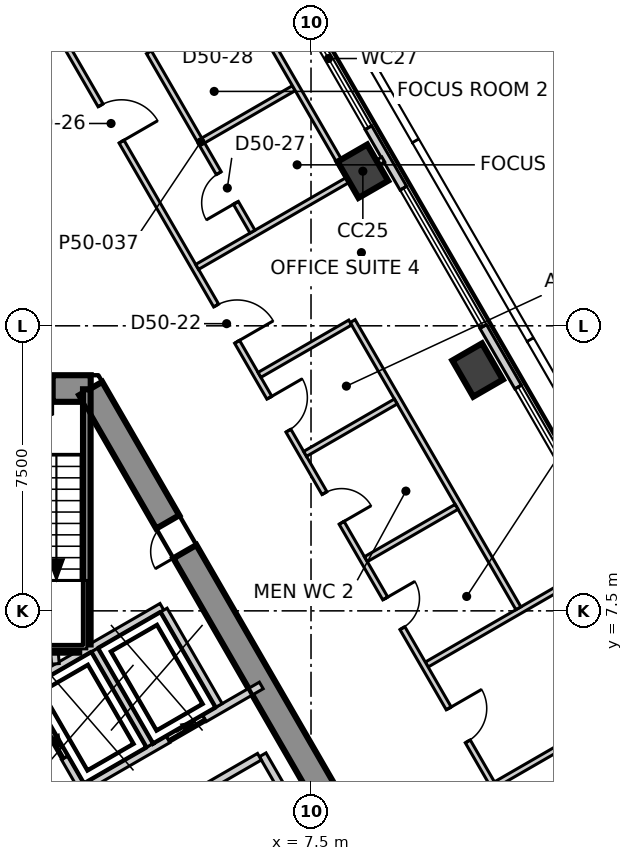
"""IFC4 building model, lengths in metres.
Left out: names, types, materials, properties, quantities, classifications, styles, units other than length and angle.
Written with IfcOpenShell. Run it as: python <this file> out.ifc"""

import sys

from ifc_helpers import new_model, si_unit, direction, frame, frame_2d, origin, origin_2d, place, context, subcontext, project, spatial, polyline, rectangle, outline, extrude, element, fill, save


model = new_model("IFC4")
c1 = context("Model", 3, precision=1e-05, world=origin(), true_north=direction((0.0, 1.0)))
c2 = subcontext(c1, "Body", "Model", "MODEL_VIEW")
j1 = project(units=[si_unit("LENGTHUNIT", "METRE"), si_unit("PLANEANGLEUNIT", "RADIAN")], contexts=[c1])
p1 = place(None, origin())
s1 = spatial("IfcSite", under=j1, at=p1, CompositionType="ELEMENT")
p2 = place(p1, origin())
s2 = spatial("IfcBuilding", under=s1, at=p2, CompositionType="ELEMENT")
p3 = place(p2, frame((0.0, 0.0, 215.3)))
s3 = spatial("IfcBuildingStorey", under=s2, at=p3, CompositionType="ELEMENT", Elevation=215.3)
p4 = place(p3, frame((1.703, 13.35, -0.3), z_axis=(0.0, 0.0, 1.0), x_axis=(-1.0, 0.0, 0.0)))
e1 = element("IfcWall", 1, at=p4, inside=s3, PredefinedType="SHEAR", context=c2, shape_type="SweptSolid", body=[
    extrude(outline(polyline([(-0.202, -0.35), (1.703, -0.35), (3.608, -0.35), (3.204, 0.35), (1.703, 0.35), (0.202, 0.35), (-0.202, -0.35)])), origin(), (0.0, 0.0, 1.0), 4.0),
])
p5 = place(p4, frame((1.003, 0.0, 0.3)))
e2 = element("IfcOpeningElement", 2, at=p5, cuts=e1, PredefinedType="OPENING", context=c2, shape_type="SweptSolid", body=[
    extrude(rectangle(XDim=1.4, YDim=2.1, at=frame_2d((0.7, 1.05))), frame((0.0, 0.36, 0.0), z_axis=(0.0, -1.0, 0.0), x_axis=(1.0, 0.0, 0.0)), (0.0, 0.0, 1.0), 0.72),
])
p6 = place(p3, frame((12.413, -5.2, -0.3), z_axis=(0.0, 0.0, 1.0), x_axis=(-0.500011533395, 0.866018744874, 0.0)))
e3 = element("IfcWall", 3, at=p6, inside=s3, PredefinedType="SHEAR", context=c2, shape_type="SweptSolid", body=[
    extrude(outline(polyline([(-0.202, -0.35), (1.782, -0.35), (3.766, -0.35), (5.75, -0.35), (7.734, -0.35), (9.718, -0.35), (11.702, -0.35), (13.686, -0.35), (15.67, -0.35), (17.654, -0.35), (19.638, -0.35), (21.622, -0.35), (21.218, 0.35), (19.307, 0.35), (17.397, 0.35), (15.486, 0.35), (13.576, 0.35), (11.665, 0.35), (9.755, 0.35), (7.844, 0.35), (5.934, 0.35), (4.023, 0.35), (2.113, 0.35), (0.202, 0.35), (-0.202, -0.35)])), origin(), (0.0, 0.0, 1.0), 4.0),
])
p7 = place(p6, frame((4.055, 0.0, 0.3)))
e4 = element("IfcOpeningElement", 4, at=p7, cuts=e3, PredefinedType="OPENING", context=c2, shape_type="SweptSolid", body=[
    extrude(rectangle(XDim=0.9, YDim=2.1, at=frame_2d((0.45, 1.05))), frame((0.0, 0.36, 0.0), z_axis=(0.0, -1.0, 0.0), x_axis=(1.0, 0.0, 0.0)), (0.0, 0.0, 1.0), 0.72),
])
p8 = place(p6, frame((16.465, 0.0, 0.3)))
e5 = element("IfcOpeningElement", 5, at=p8, cuts=e3, PredefinedType="OPENING", context=c2, shape_type="SweptSolid", body=[
    extrude(rectangle(XDim=0.9, YDim=2.1, at=frame_2d((0.45, 1.05))), frame((0.0, 0.36, 0.0), z_axis=(0.0, -1.0, 0.0), x_axis=(1.0, 0.0, 0.0)), (0.0, 0.0, 1.0), 0.72),
])
for number, where, z_axis, x_axis in (
    (6, (11.884, 13.836, -0.3), (0.0, 0.0, 1.0), (-0.5, 0.866, 0.0)),
    (7, (8.864, 19.068, -0.3), (0.0, 0.0, 1.0), (-0.5, 0.866, 0.0)),
):
    element("IfcColumn", number, at=place(p3, frame(where, z_axis=z_axis, x_axis=x_axis)), inside=s3, PredefinedType="COLUMN", context=c2, shape_type="SweptSolid", body=[
        extrude(rectangle(XDim=1.1, YDim=0.9, at=origin_2d()), origin(), (0.0, 0.0, 1.0), 4.0),
    ])
p9 = place(p3, frame((28.243, -13.098, 0.0), z_axis=(0.0, 0.0, 1.0), x_axis=(-0.500001688958, 0.866024428662, 0.0)))
e8 = element("IfcWall", 8, at=p9, inside=s3, PredefinedType="ELEMENTEDWALL", context=c2, shape_type="SweptSolid", body=[
    extrude(rectangle(XDim=50.909, YDim=0.2, at=frame_2d((25.455, 0.0))), origin(), (0.0, 0.0, 1.0), 3.7),
])
p10 = place(p9, frame((2.223, 0.0, 0.9)))
e9 = element("IfcOpeningElement", 9, at=p10, cuts=e8, PredefinedType="OPENING", context=c2, shape_type="SweptSolid", body=[
    extrude(rectangle(XDim=4.2, YDim=2.5, at=frame_2d((2.1, 1.25))), frame((0.0, 0.11, 0.0), z_axis=(0.0, -1.0, 0.0), x_axis=(1.0, 0.0, 0.0)), (0.0, 0.0, 1.0), 0.22),
])
p11 = place(p9, frame((8.263, 0.0, 0.9)))
e10 = element("IfcOpeningElement", 10, at=p11, cuts=e8, PredefinedType="OPENING", context=c2, shape_type="SweptSolid", body=[
    extrude(rectangle(XDim=4.2, YDim=2.5, at=frame_2d((2.1, 1.25))), frame((0.0, 0.11, 0.0), z_axis=(0.0, -1.0, 0.0), x_axis=(1.0, 0.0, 0.0)), (0.0, 0.0, 1.0), 0.22),
])
p12 = place(p9, frame((14.304, 0.0, 0.9)))
e11 = element("IfcOpeningElement", 11, at=p12, cuts=e8, PredefinedType="OPENING", context=c2, shape_type="SweptSolid", body=[
    extrude(rectangle(XDim=4.2, YDim=2.5, at=frame_2d((2.1, 1.25))), frame((0.0, 0.11, 0.0), z_axis=(0.0, -1.0, 0.0), x_axis=(1.0, 0.0, 0.0)), (0.0, 0.0, 1.0), 0.22),
])
p13 = place(p9, frame((20.345, 0.0, 0.9)))
e12 = element("IfcOpeningElement", 12, at=p13, cuts=e8, PredefinedType="OPENING", context=c2, shape_type="SweptSolid", body=[
    extrude(rectangle(XDim=4.2, YDim=2.5, at=frame_2d((2.1, 1.25))), frame((0.0, 0.11, 0.0), z_axis=(0.0, -1.0, 0.0), x_axis=(1.0, 0.0, 0.0)), (0.0, 0.0, 1.0), 0.22),
])
p14 = place(p9, frame((26.385, 0.0, 0.9)))
e13 = element("IfcOpeningElement", 13, at=p14, cuts=e8, PredefinedType="OPENING", context=c2, shape_type="SweptSolid", body=[
    extrude(rectangle(XDim=4.2, YDim=2.5, at=frame_2d((2.1, 1.25))), frame((0.0, 0.11, 0.0), z_axis=(0.0, -1.0, 0.0), x_axis=(1.0, 0.0, 0.0)), (0.0, 0.0, 1.0), 0.22),
])
p15 = place(p9, frame((32.426, 0.0, 0.9)))
e14 = element("IfcOpeningElement", 14, at=p15, cuts=e8, PredefinedType="OPENING", context=c2, shape_type="SweptSolid", body=[
    extrude(rectangle(XDim=4.2, YDim=2.5, at=frame_2d((2.1, 1.25))), frame((0.0, 0.11, 0.0), z_axis=(0.0, -1.0, 0.0), x_axis=(1.0, 0.0, 0.0)), (0.0, 0.0, 1.0), 0.22),
])
p16 = place(p9, frame((38.466, 0.0, 0.9)))
e15 = element("IfcOpeningElement", 15, at=p16, cuts=e8, PredefinedType="OPENING", context=c2, shape_type="SweptSolid", body=[
    extrude(rectangle(XDim=4.2, YDim=2.5, at=frame_2d((2.1, 1.25))), frame((0.0, 0.11, 0.0), z_axis=(0.0, -1.0, 0.0), x_axis=(1.0, 0.0, 0.0)), (0.0, 0.0, 1.0), 0.22),
])
p17 = place(p9, frame((44.507, 0.0, 0.9)))
e16 = element("IfcOpeningElement", 16, at=p17, cuts=e8, PredefinedType="OPENING", context=c2, shape_type="SweptSolid", body=[
    extrude(rectangle(XDim=4.2, YDim=2.5, at=frame_2d((2.1, 1.25))), frame((0.0, 0.11, 0.0), z_axis=(0.0, -1.0, 0.0), x_axis=(1.0, 0.0, 0.0)), (0.0, 0.0, 1.0), 0.22),
])
p18 = place(p3, frame((10.544, 6.087, 0.0), z_axis=(0.0, 0.0, 1.0), x_axis=(0.865959810878, 0.500113593041, 0.0)))
e17 = element("IfcWall", 17, at=p18, inside=s3, PredefinedType="PARTITIONING", context=c2, shape_type="SweptSolid", body=[
    extrude(rectangle(XDim=5.655, YDim=0.15, at=frame_2d((2.828, 0.0))), origin(), (0.0, 0.0, 1.0), 3.2),
])
p19 = place(p3, frame((0.075, 24.07, 0.0), z_axis=(0.0, 0.0, 1.0), x_axis=(0.500006834213, -0.866021458014, 0.0)))
e18 = element("IfcWall", 18, at=p19, inside=s3, PredefinedType="PARTITIONING", context=c2, shape_type="SweptSolid", body=[
    extrude(rectangle(XDim=41.616, YDim=0.15, at=frame_2d((20.808, 0.0))), origin(), (0.0, 0.0, 1.0), 3.7),
])
p20 = place(p19, frame((33.715, 0.0, 0.0)))
e19 = element("IfcOpeningElement", 19, at=p20, cuts=e18, PredefinedType="OPENING", context=c2, shape_type="SweptSolid", body=[
    extrude(rectangle(XDim=1.1, YDim=2.1, at=frame_2d((0.55, 1.05))), frame((0.0, 0.085, 0.0), z_axis=(0.0, -1.0, 0.0), x_axis=(1.0, 0.0, 0.0)), (0.0, 0.0, 1.0), 0.17),
])
p21 = place(p19, frame((22.098, 0.0, 0.0)))
e20 = element("IfcOpeningElement", 20, at=p21, cuts=e18, PredefinedType="OPENING", context=c2, shape_type="SweptSolid", body=[
    extrude(rectangle(XDim=1.0, YDim=2.1, at=frame_2d((0.5, 1.05))), frame((0.0, 0.085, 0.0), z_axis=(0.0, -1.0, 0.0), x_axis=(1.0, 0.0, 0.0)), (0.0, 0.0, 1.0), 0.17),
])
p22 = place(p19, frame((25.198, 0.0, 0.0)))
e21 = element("IfcOpeningElement", 21, at=p22, cuts=e18, PredefinedType="OPENING", context=c2, shape_type="SweptSolid", body=[
    extrude(rectangle(XDim=0.9, YDim=2.1, at=frame_2d((0.45, 1.05))), frame((0.0, 0.085, 0.0), z_axis=(0.0, -1.0, 0.0), x_axis=(1.0, 0.0, 0.0)), (0.0, 0.0, 1.0), 0.17),
])
p23 = place(p19, frame((9.858, 0.0, 0.0)))
e22 = element("IfcOpeningElement", 22, at=p23, cuts=e18, PredefinedType="OPENING", context=c2, shape_type="SweptSolid", body=[
    extrude(rectangle(XDim=1.1, YDim=2.1, at=frame_2d((0.55, 1.05))), frame((0.0, 0.085, 0.0), z_axis=(0.0, -1.0, 0.0), x_axis=(1.0, 0.0, 0.0)), (0.0, 0.0, 1.0), 0.17),
])
p24 = place(p19, frame((18.758, 0.0, 0.0)))
e23 = element("IfcOpeningElement", 23, at=p24, cuts=e18, PredefinedType="OPENING", context=c2, shape_type="SweptSolid", body=[
    extrude(rectangle(XDim=0.9, YDim=2.1, at=frame_2d((0.45, 1.05))), frame((0.0, 0.085, 0.0), z_axis=(0.0, -1.0, 0.0), x_axis=(1.0, 0.0, 0.0)), (0.0, 0.0, 1.0), 0.17),
])
p25 = place(p19, frame((15.558, 0.0, 0.0)))
e24 = element("IfcOpeningElement", 24, at=p25, cuts=e18, PredefinedType="OPENING", context=c2, shape_type="SweptSolid", body=[
    extrude(rectangle(XDim=0.9, YDim=2.1, at=frame_2d((0.45, 1.05))), frame((0.0, 0.085, 0.0), z_axis=(0.0, -1.0, 0.0), x_axis=(1.0, 0.0, 0.0)), (0.0, 0.0, 1.0), 0.17),
])
p26 = place(p19, frame((12.658, 0.0, 0.0)))
e25 = element("IfcOpeningElement", 25, at=p26, cuts=e18, PredefinedType="OPENING", context=c2, shape_type="SweptSolid", body=[
    extrude(rectangle(XDim=1.0, YDim=2.1, at=frame_2d((0.5, 1.05))), frame((0.0, 0.085, 0.0), z_axis=(0.0, -1.0, 0.0), x_axis=(1.0, 0.0, 0.0)), (0.0, 0.0, 1.0), 0.17),
])
p27 = place(p19, frame((3.776, 0.0, 0.0)))
e26 = element("IfcOpeningElement", 26, at=p27, cuts=e18, PredefinedType="OPENING", context=c2, shape_type="SweptSolid", body=[
    extrude(rectangle(XDim=1.1, YDim=2.1, at=frame_2d((0.55, 1.05))), frame((0.0, 0.085, 0.0), z_axis=(0.0, -1.0, 0.0), x_axis=(1.0, 0.0, 0.0)), (0.0, 0.0, 1.0), 0.17),
])
p28 = place(p3, frame((4.503, 16.55, 0.0), z_axis=(0.0, 0.0, 1.0), x_axis=(0.866021685936, 0.500006439447, 0.0)))
e27 = element("IfcWall", 27, at=p28, inside=s3, PredefinedType="PARTITIONING", context=c2, shape_type="SweptSolid", body=[
    extrude(rectangle(XDim=5.656, YDim=0.15, at=frame_2d((2.828, 0.0))), origin(), (0.0, 0.0, 1.0), 3.7),
])
p29 = place(p3, frame((8.595, 15.124, 0.0), z_axis=(0.0, 0.0, 1.0), x_axis=(0.499970334739, -0.866042530354, 0.0)))
e28 = element("IfcWall", 28, at=p29, inside=s3, PredefinedType="PARTITIONING", context=c2, shape_type="SweptSolid", body=[
    extrude(rectangle(XDim=8.725, YDim=0.15, at=frame_2d((4.362, 0.0))), origin(), (0.0, 0.0, 1.0), 3.7),
])
p30 = place(p3, frame((6.144, 13.709, 0.0), z_axis=(0.0, 0.0, 1.0), x_axis=(0.866119184418, 0.499837531988, 0.0)))
e29 = element("IfcWall", 29, at=p30, inside=s3, PredefinedType="PARTITIONING", context=c2, shape_type="SweptSolid", body=[
    extrude(rectangle(XDim=2.755, YDim=0.15, at=frame_2d((1.377, 0.0))), origin(), (0.0, 0.0, 1.0), 3.7),
])
p31 = place(p3, frame((7.344, 11.63, 0.0), z_axis=(0.0, 0.0, 1.0), x_axis=(0.86592732884, 0.500169832324, 0.0)))
e30 = element("IfcWall", 30, at=p31, inside=s3, PredefinedType="PARTITIONING", context=c2, shape_type="SweptSolid", body=[
    extrude(rectangle(XDim=2.755, YDim=0.15, at=frame_2d((1.378, 0.0))), origin(), (0.0, 0.0, 1.0), 3.7),
])
p32 = place(p3, frame((8.944, 8.859, 0.0), z_axis=(0.0, 0.0, 1.0), x_axis=(0.866080816704, 0.499904009723, 0.0)))
e31 = element("IfcWall", 31, at=p32, inside=s3, PredefinedType="PARTITIONING", context=c2, shape_type="SweptSolid", body=[
    extrude(rectangle(XDim=2.755, YDim=0.15, at=frame_2d((1.377, 0.0))), origin(), (0.0, 0.0, 1.0), 3.7),
])
p33 = place(p3, frame((12.364, 2.935, 0.0), z_axis=(0.0, 0.0, 1.0), x_axis=(0.865965703354, 0.500103389924, 0.0)))
e32 = element("IfcWall", 32, at=p33, inside=s3, PredefinedType="PARTITIONING", context=c2, shape_type="SweptSolid", body=[
    extrude(rectangle(XDim=2.755, YDim=0.15, at=frame_2d((1.378, 0.0))), origin(), (0.0, 0.0, 1.0), 3.7),
])
p34 = place(p3, frame((13.564, 0.857, 0.0), z_axis=(0.0, 0.0, 1.0), x_axis=(0.866034596441, 0.499984077514, 0.0)))
e33 = element("IfcWall", 33, at=p34, inside=s3, PredefinedType="PARTITIONING", context=c2, shape_type="SweptSolid", body=[
    extrude(rectangle(XDim=5.655, YDim=0.15, at=frame_2d((2.827, 0.0))), origin(), (0.0, 0.0, 1.0), 3.7),
])
p35 = place(p3, frame((4.662, 19.875, 0.0), z_axis=(0.0, 0.0, 1.0), x_axis=(0.865965703354, 0.500103389924, 0.0)))
e34 = element("IfcWall", 34, at=p35, inside=s3, PredefinedType="PARTITIONING", context=c2, shape_type="SweptSolid", body=[
    extrude(rectangle(XDim=2.755, YDim=0.15, at=frame_2d((1.378, 0.0))), origin(), (0.0, 0.0, 1.0), 3.7),
])
p36 = place(p3, frame((5.713, 23.715, 0.0), z_axis=(0.0, 0.0, 1.0), x_axis=(0.499931554694, -0.866064917094, 0.0)))
e35 = element("IfcWall", 35, at=p36, inside=s3, PredefinedType="PARTITIONING", context=c2, shape_type="SweptSolid", body=[
    extrude(rectangle(XDim=5.525, YDim=0.15, at=frame_2d((2.763, 0.0))), origin(), (0.0, 0.0, 1.0), 2.95),
])
p37 = place(p3, frame((3.235, 22.198, 0.0), z_axis=(0.0, 0.0, 1.0), x_axis=(0.49996933381, -0.866043108194, 0.0)))
e36 = element("IfcWall", 36, at=p37, inside=s3, PredefinedType="PARTITIONING", context=c2, shape_type="SweptSolid", body=[
    extrude(rectangle(XDim=5.45, YDim=0.15, at=frame_2d((2.725, 0.0))), origin(), (0.0, 0.0, 1.0), 3.7),
])
p38 = place(p37, frame((3.675, 0.0, 0.0)))
e37 = element("IfcOpeningElement", 37, at=p38, cuts=e36, PredefinedType="OPENING", context=c2, shape_type="SweptSolid", body=[
    extrude(rectangle(XDim=0.9, YDim=2.1, at=frame_2d((0.45, 1.05))), frame((0.0, 0.085, 0.0), z_axis=(0.0, -1.0, 0.0), x_axis=(1.0, 0.0, 0.0)), (0.0, 0.0, 1.0), 0.17),
])
p39 = place(p3, frame((-0.002, 5.541, 0.0), z_axis=(0.0, 0.0, 1.0), x_axis=(0.86600155993, 0.500041296494, 0.0)))
e38 = element("IfcWall", 38, at=p39, inside=s3, PredefinedType="SOLIDWALL", context=c2, shape_type="SweptSolid", body=[
    extrude(rectangle(XDim=4.132, YDim=0.2, at=frame_2d((2.066, 0.0))), origin(), (0.0, 0.0, 1.0), 3.7),
])
p40 = place(p3, frame((0.0, 5.4, 0.0), z_axis=(0.0, 0.0, 1.0), x_axis=(0.500103862429, -0.865965430478, 0.0)))
e39 = element("IfcWall", 39, at=p40, inside=s3, PredefinedType="SOLIDWALL", context=c2, shape_type="SweptSolid", body=[
    extrude(rectangle(XDim=2.973, YDim=0.2, at=frame_2d((1.487, 0.0))), origin(), (0.0, 0.0, 1.0), 3.7),
])
p41 = place(p40, frame((0.937, 0.0, 0.0)))
e40 = element("IfcOpeningElement", 40, at=p41, cuts=e39, PredefinedType="OPENING", context=c2, shape_type="SweptSolid", body=[
    extrude(rectangle(XDim=1.1, YDim=2.1, at=frame_2d((0.55, 1.05))), frame((0.0, 0.11, 0.0), z_axis=(0.0, -1.0, 0.0), x_axis=(1.0, 0.0, 0.0)), (0.0, 0.0, 1.0), 0.22),
])
p42 = place(p3, frame((1.578, 2.874, 0.0), z_axis=(0.0, 0.0, 1.0), x_axis=(0.866045911672, 0.499964477614, 0.0)))
e41 = element("IfcWall", 41, at=p42, inside=s3, PredefinedType="SOLIDWALL", context=c2, shape_type="SweptSolid", body=[
    extrude(rectangle(XDim=5.327, YDim=0.2, at=frame_2d((2.663, 0.0))), origin(), (0.0, 0.0, 1.0), 3.7),
])
p43 = place(p42, frame((2.496, 0.0, 0.0)))
e42 = element("IfcOpeningElement", 42, at=p43, cuts=e41, PredefinedType="OPENING", context=c2, shape_type="SweptSolid", body=[
    extrude(rectangle(XDim=1.1, YDim=2.1, at=frame_2d((0.55, 1.05))), frame((0.0, 0.11, 0.0), z_axis=(0.0, -1.0, 0.0), x_axis=(1.0, 0.0, 0.0)), (0.0, 0.0, 1.0), 0.22),
])
for number, where, z_axis, x_axis in (
    (43, (3.626, 7.52, 0.0), (0.0, 0.0, 1.0), (0.5, -0.866, 0.0)),
    (44, (1.807, 6.47, 0.0), (0.0, 0.0, 1.0), (0.5, -0.866, 0.0)),
):
    element("IfcWall", number, at=place(p3, frame(where, z_axis=z_axis, x_axis=x_axis)), inside=s3, PredefinedType="SOLIDWALL", context=c2, shape_type="SweptSolid", body=[
        extrude(rectangle(XDim=2.9, YDim=0.2, at=frame_2d((1.45, 0.0))), origin(), (0.0, 0.0, 1.0), 3.7),
    ])
p44 = place(p3, frame((6.229, 3.712, 0.0), z_axis=(0.0, 0.0, 1.0), x_axis=(0.499875724984, -0.86609714211, 0.0)))
e45 = element("IfcWall", 45, at=p44, inside=s3, PredefinedType="SOLIDWALL", context=c2, shape_type="SweptSolid", body=[
    extrude(rectangle(XDim=1.701, YDim=0.2, at=frame_2d((0.85, 0.0))), origin(), (0.0, 0.0, 1.0), 3.7),
])
p45 = place(p3, frame((2.548, 1.587, 0.0), z_axis=(0.0, 0.0, 1.0), x_axis=(0.866004344652, 0.500036473714, 0.0)))
e46 = element("IfcWall", 46, at=p45, inside=s3, PredefinedType="SOLIDWALL", context=c2, shape_type="SweptSolid", body=[
    extrude(rectangle(XDim=4.15, YDim=0.2, at=frame_2d((2.075, 0.0))), origin(), (0.0, 0.0, 1.0), 3.7),
])
p46 = place(p45, frame((1.675, 0.0, 0.0)))
e47 = element("IfcOpeningElement", 47, at=p46, cuts=e46, PredefinedType="OPENING", context=c2, shape_type="SweptSolid", body=[
    extrude(rectangle(XDim=0.9, YDim=2.1, at=frame_2d((0.45, 1.05))), frame((0.0, 0.11, 0.0), z_axis=(0.0, -1.0, 0.0), x_axis=(1.0, 0.0, 0.0)), (0.0, 0.0, 1.0), 0.22),
])
p47 = place(p3, frame((0.75, 6.4, 0.0), z_axis=(0.0, 0.0, 1.0), x_axis=(0.080860177601, -0.996725454515, 0.0)))
e48 = element("IfcWall", 48, at=p47, inside=s3, PredefinedType="SOLIDWALL", context=c2, shape_type="SweptSolid", body=[
    extrude(rectangle(XDim=0.296, YDim=0.2, at=frame_2d((0.148, 0.0))), origin(), (0.0, 0.0, 1.0), 3.7),
])
p48 = place(p3, frame((1.6, 6.615, 0.0), z_axis=(0.0, 0.0, 1.0), x_axis=(0.0, 1.0, 0.0)))
e49 = element("IfcWall", 49, at=p48, inside=s3, PredefinedType="SOLIDWALL", context=c2, shape_type="SweptSolid", body=[
    extrude(rectangle(XDim=6.715, YDim=0.2, at=frame_2d((3.357, 0.0))), origin(), (0.0, 0.0, 1.0), 3.7),
])
p49 = place(p3, frame((-1.4, 6.5, 0.0), z_axis=(0.0, 0.0, 1.0), x_axis=(1.0, 0.0, 0.0)))
e50 = element("IfcWall", 50, at=p49, inside=s3, PredefinedType="SOLIDWALL", context=c2, shape_type="SweptSolid", body=[
    extrude(rectangle(XDim=2.8, YDim=0.2, at=frame_2d((1.4, 0.0))), origin(), (0.0, 0.0, 1.0), 3.7),
])
p50 = place(p14, origin())
e51 = element("IfcWindow", 51, at=p50, inside=s3, PartitioningType="SINGLE_PANEL", PredefinedType="WINDOW", context=c2, shape_type="SweptSolid", body=[
    extrude(rectangle(XDim=4.2, YDim=2.5, at=frame_2d((2.1, 1.25))), frame((0.0, 0.03, 0.0), z_axis=(0.0, -1.0, 0.0), x_axis=(1.0, 0.0, 0.0)), (0.0, 0.0, 1.0), 0.06),
])
fill(e13, e51)
p51 = place(p15, origin())
e52 = element("IfcWindow", 52, at=p51, inside=s3, PartitioningType="SINGLE_PANEL", PredefinedType="WINDOW", context=c2, shape_type="SweptSolid", body=[
    extrude(rectangle(XDim=4.2, YDim=2.5, at=frame_2d((2.1, 1.25))), frame((0.0, 0.03, 0.0), z_axis=(0.0, -1.0, 0.0), x_axis=(1.0, 0.0, 0.0)), (0.0, 0.0, 1.0), 0.06),
])
fill(e14, e52)
p52 = place(p16, origin())
e53 = element("IfcWindow", 53, at=p52, inside=s3, PartitioningType="SINGLE_PANEL", PredefinedType="WINDOW", context=c2, shape_type="SweptSolid", body=[
    extrude(rectangle(XDim=4.2, YDim=2.5, at=frame_2d((2.1, 1.25))), frame((0.0, 0.03, 0.0), z_axis=(0.0, -1.0, 0.0), x_axis=(1.0, 0.0, 0.0)), (0.0, 0.0, 1.0), 0.06),
])
fill(e15, e53)
p53 = place(p41, origin())
e54 = element("IfcDoor", 54, at=p53, inside=s3, OperationType="SLIDING_TO_LEFT", PredefinedType="DOOR", context=c2, shape_type="SweptSolid", body=[
    extrude(rectangle(XDim=1.1, YDim=2.1, at=frame_2d((0.55, 1.05))), frame((0.0, 0.025, 0.0), z_axis=(0.0, -1.0, 0.0), x_axis=(1.0, 0.0, 0.0)), (0.0, 0.0, 1.0), 0.05),
])
fill(e40, e54)
p54 = place(p43, origin())
e55 = element("IfcDoor", 55, at=p54, inside=s3, OperationType="SLIDING_TO_LEFT", PredefinedType="DOOR", context=c2, shape_type="SweptSolid", body=[
    extrude(rectangle(XDim=1.1, YDim=2.1, at=frame_2d((0.55, 1.05))), frame((0.0, 0.025, 0.0), z_axis=(0.0, -1.0, 0.0), x_axis=(1.0, 0.0, 0.0)), (0.0, 0.0, 1.0), 0.05),
])
fill(e42, e55)
p55 = place(p21, origin())
e56 = element("IfcDoor", 56, at=p55, inside=s3, OperationType="SINGLE_SWING_RIGHT", PredefinedType="DOOR", context=c2, shape_type="SweptSolid", body=[
    extrude(rectangle(XDim=1.0, YDim=2.1, at=frame_2d((0.5, 1.05))), frame((0.0, 0.025, 0.0), z_axis=(0.0, -1.0, 0.0), x_axis=(1.0, 0.0, 0.0)), (0.0, 0.0, 1.0), 0.05),
])
fill(e20, e56)
p56 = place(p23, origin())
e57 = element("IfcDoor", 57, at=p56, inside=s3, OperationType="SINGLE_SWING_LEFT", PredefinedType="DOOR", context=c2, shape_type="SweptSolid", body=[
    extrude(rectangle(XDim=1.1, YDim=2.1, at=frame_2d((0.55, 1.05))), frame((0.0, 0.025, 0.0), z_axis=(0.0, -1.0, 0.0), x_axis=(1.0, 0.0, 0.0)), (0.0, 0.0, 1.0), 0.05),
])
fill(e22, e57)
p57 = place(p24, origin())
e58 = element("IfcDoor", 58, at=p57, inside=s3, OperationType="SINGLE_SWING_RIGHT", PredefinedType="DOOR", context=c2, shape_type="SweptSolid", body=[
    extrude(rectangle(XDim=0.9, YDim=2.1, at=frame_2d((0.45, 1.05))), frame((0.0, 0.025, 0.0), z_axis=(0.0, -1.0, 0.0), x_axis=(1.0, 0.0, 0.0)), (0.0, 0.0, 1.0), 0.05),
])
fill(e23, e58)
p58 = place(p25, origin())
e59 = element("IfcDoor", 59, at=p58, inside=s3, OperationType="SINGLE_SWING_LEFT", PredefinedType="DOOR", context=c2, shape_type="SweptSolid", body=[
    extrude(rectangle(XDim=0.9, YDim=2.1, at=frame_2d((0.45, 1.05))), frame((0.0, 0.025, 0.0), z_axis=(0.0, -1.0, 0.0), x_axis=(1.0, 0.0, 0.0)), (0.0, 0.0, 1.0), 0.05),
])
fill(e24, e59)
p59 = place(p26, origin())
e60 = element("IfcDoor", 60, at=p59, inside=s3, OperationType="SINGLE_SWING_RIGHT", PredefinedType="DOOR", context=c2, shape_type="SweptSolid", body=[
    extrude(rectangle(XDim=1.0, YDim=2.1, at=frame_2d((0.5, 1.05))), frame((0.0, 0.025, 0.0), z_axis=(0.0, -1.0, 0.0), x_axis=(1.0, 0.0, 0.0)), (0.0, 0.0, 1.0), 0.05),
])
fill(e25, e60)
p60 = place(p27, origin())
e61 = element("IfcDoor", 61, at=p60, inside=s3, OperationType="SINGLE_SWING_LEFT", PredefinedType="DOOR", context=c2, shape_type="SweptSolid", body=[
    extrude(rectangle(XDim=1.1, YDim=2.1, at=frame_2d((0.55, 1.05))), frame((0.0, 0.025, 0.0), z_axis=(0.0, -1.0, 0.0), x_axis=(1.0, 0.0, 0.0)), (0.0, 0.0, 1.0), 0.05),
])
fill(e26, e61)
p61 = place(p38, origin())
e62 = element("IfcDoor", 62, at=p61, inside=s3, OperationType="SINGLE_SWING_RIGHT", PredefinedType="DOOR", context=c2, shape_type="SweptSolid", body=[
    extrude(rectangle(XDim=0.9, YDim=2.1, at=frame_2d((0.45, 1.05))), frame((0.0, 0.025, 0.0), z_axis=(0.0, -1.0, 0.0), x_axis=(1.0, 0.0, 0.0)), (0.0, 0.0, 1.0), 0.05),
])
fill(e37, e62)
p62 = place(p8, origin())
e63 = element("IfcDoor", 63, at=p62, inside=s3, OperationType="SINGLE_SWING_RIGHT", PredefinedType="DOOR", context=c2, shape_type="SweptSolid", body=[
    extrude(rectangle(XDim=0.9, YDim=2.1, at=frame_2d((0.45, 1.05))), frame((0.0, 0.025, 0.0), z_axis=(0.0, -1.0, 0.0), x_axis=(1.0, 0.0, 0.0)), (0.0, 0.0, 1.0), 0.05),
])
fill(e5, e63)
save(model, sys.argv[1])
